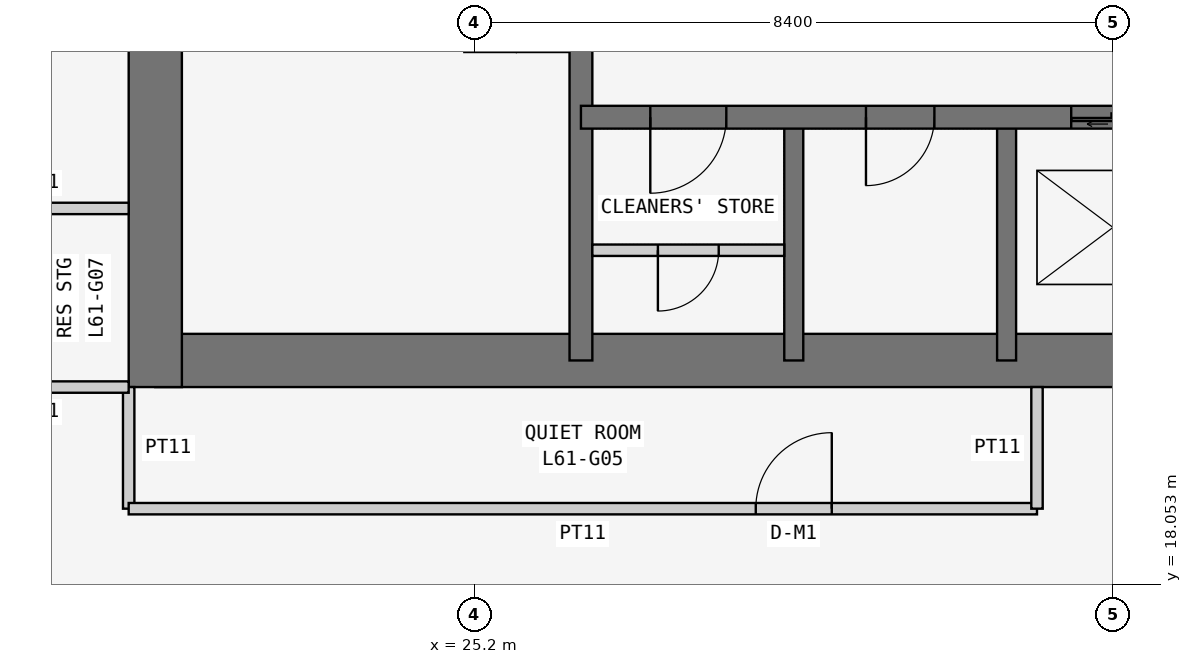
"""IFC4 building model, lengths in metres.
Left out: names, types, materials, properties, quantities, classifications, styles, units other than length and angle.
Written with IfcOpenShell. Run it as: python <this file> out.ifc"""

import sys

from ifc_helpers import new_model, si_unit, direction, frame, frame_2d, origin, place, context, subcontext, project, spatial, rectangle, extrude, element, fill, save


model = new_model("IFC4")
c1 = context("Model", 3, precision=1e-05, world=origin(), true_north=direction((0.0, 1.0)))
c2 = subcontext(c1, "Body", "Model", "MODEL_VIEW")
j1 = project(units=[si_unit("LENGTHUNIT", "METRE"), si_unit("PLANEANGLEUNIT", "RADIAN")], contexts=[c1])
p1 = place(None, origin())
s1 = spatial("IfcSite", under=j1, at=p1, CompositionType="ELEMENT")
p2 = place(p1, origin())
s2 = spatial("IfcBuilding", under=s1, at=p2, CompositionType="ELEMENT")
p3 = place(p2, frame((0.0, 0.0, 233.7)))
s3 = spatial("IfcBuildingStorey", under=s2, at=p3, CompositionType="ELEMENT", Elevation=233.7)
p4 = place(p3, frame((21.0, 21.0, 0.0), z_axis=(0.0, 0.0, 1.0), x_axis=(1.0, 0.0, 0.0)))
e1 = element("IfcWall", 1, at=p4, inside=s3, PredefinedType="SHEAR", context=c2, shape_type="SweptSolid", body=[
    extrude(rectangle(XDim=17.15, YDim=0.7, at=frame_2d((8.575, 0.0))), origin(), (0.0, 0.0, 1.0), 3.6),
])
p5 = place(p3, frame((21.0, 37.8, 0.0), z_axis=(0.0, 0.0, 1.0), x_axis=(0.0, -1.0, 0.0)))
e2 = element("IfcWall", 2, at=p5, inside=s3, PredefinedType="SHEAR", context=c2, shape_type="SweptSolid", body=[
    extrude(rectangle(XDim=17.15, YDim=0.7, at=frame_2d((8.575, 0.0))), origin(), (0.0, 0.0, 1.0), 3.6),
])
p6 = place(p5, frame((5.4, 0.0, 0.0)))
e3 = element("IfcOpeningElement", 3, at=p6, cuts=e2, PredefinedType="OPENING", context=c2, shape_type="SweptSolid", body=[
    extrude(rectangle(XDim=1.2, YDim=2.1, at=frame_2d((0.6, 1.05))), frame((0.0, 0.36, 0.0), z_axis=(0.0, -1.0, 0.0), x_axis=(1.0, 0.0, 0.0)), (0.0, 0.0, 1.0), 0.72),
])
p7 = place(p3, frame((26.6, 21.0, 0.0), z_axis=(0.0, 0.0, 1.0), x_axis=(0.0, 1.0, 0.0)))
e4 = element("IfcWall", 4, at=p7, inside=s3, PredefinedType="SHEAR", context=c2, shape_type="SweptSolid", body=[
    extrude(rectangle(XDim=16.8, YDim=0.3, at=frame_2d((8.4, 0.0))), origin(), (0.0, 0.0, 1.0), 3.6),
])
p8 = place(p7, frame((10.4, 0.0, 0.0)))
e5 = element("IfcOpeningElement", 5, at=p8, cuts=e4, PredefinedType="OPENING", context=c2, shape_type="SweptSolid", body=[
    extrude(rectangle(XDim=1.2, YDim=2.1, at=frame_2d((0.6, 1.05))), frame((0.0, 0.16, 0.0), z_axis=(0.0, -1.0, 0.0), x_axis=(1.0, 0.0, 0.0)), (0.0, 0.0, 1.0), 0.32),
])
p9 = place(p3, frame((26.6, 24.2, 0.0), z_axis=(0.0, 0.0, 1.0), x_axis=(1.0, 0.0, 0.0)))
e6 = element("IfcWall", 6, at=p9, inside=s3, PredefinedType="SHEAR", context=c2, shape_type="SweptSolid", body=[
    extrude(rectangle(XDim=11.2, YDim=0.3, at=frame_2d((5.6, 0.0))), origin(), (0.0, 0.0, 1.0), 3.6),
])
p10 = place(p9, frame((0.913, 0.0, 0.0)))
e7 = element("IfcOpeningElement", 7, at=p10, cuts=e6, PredefinedType="OPENING", context=c2, shape_type="SweptSolid", body=[
    extrude(rectangle(XDim=1.0, YDim=2.1, at=frame_2d((0.5, 1.05))), frame((0.0, 0.16, 0.0), z_axis=(0.0, -1.0, 0.0), x_axis=(1.0, 0.0, 0.0)), (0.0, 0.0, 1.0), 0.32),
])
p11 = place(p9, frame((3.75, 0.0, 0.0)))
e8 = element("IfcOpeningElement", 8, at=p11, cuts=e6, PredefinedType="OPENING", context=c2, shape_type="SweptSolid", body=[
    extrude(rectangle(XDim=0.9, YDim=2.1, at=frame_2d((0.45, 1.05))), frame((0.0, 0.16, 0.0), z_axis=(0.0, -1.0, 0.0), x_axis=(1.0, 0.0, 0.0)), (0.0, 0.0, 1.0), 0.32),
])
p12 = place(p9, frame((6.45, 0.0, 0.0)))
e9 = element("IfcOpeningElement", 9, at=p12, cuts=e6, PredefinedType="OPENING", context=c2, shape_type="SweptSolid", body=[
    extrude(rectangle(XDim=1.1, YDim=2.1, at=frame_2d((0.55, 1.05))), frame((0.0, 0.16, 0.0), z_axis=(0.0, -1.0, 0.0), x_axis=(1.0, 0.0, 0.0)), (0.0, 0.0, 1.0), 0.32),
])
p13 = place(p9, frame((9.1, 0.0, 0.0)))
e10 = element("IfcOpeningElement", 10, at=p13, cuts=e6, PredefinedType="OPENING", context=c2, shape_type="SweptSolid", body=[
    extrude(rectangle(XDim=1.1, YDim=2.1, at=frame_2d((0.55, 1.05))), frame((0.0, 0.16, 0.0), z_axis=(0.0, -1.0, 0.0), x_axis=(1.0, 0.0, 0.0)), (0.0, 0.0, 1.0), 0.32),
])
for number, where, z_axis, x_axis in (
    (11, (29.4, 21.0, 0.0), (0.0, 0.0, 1.0), (0.0, 1.0, 0.0)),
    (12, (32.2, 21.0, 0.0), (0.0, 0.0, 1.0), (0.0, 1.0, 0.0)),
):
    element("IfcWall", number, at=place(p3, frame(where, z_axis=z_axis, x_axis=x_axis)), inside=s3, PredefinedType="SHEAR", context=c2, shape_type="SweptSolid", body=[
        extrude(rectangle(XDim=3.2, YDim=0.25, at=frame_2d((1.6, 0.0))), origin(), (0.0, 0.0, 1.0), 3.6),
    ])
p14 = place(p3, frame((20.65, 20.65, 0.0), z_axis=(0.0, 0.0, 1.0), x_axis=(0.0, -1.0, 0.0)))
e13 = element("IfcWall", 13, at=p14, inside=s3, PredefinedType="PARTITIONING", context=c2, shape_type="SweptSolid", body=[
    extrude(rectangle(XDim=1.6, YDim=0.15, at=frame_2d((0.8, 0.0))), origin(), (0.0, 0.0, 1.0), 3.45),
])
p15 = place(p3, frame((20.65, 19.05, 0.0), z_axis=(0.0, 0.0, 1.0), x_axis=(1.0, 0.0, 0.0)))
e14 = element("IfcWall", 14, at=p15, inside=s3, PredefinedType="PARTITIONING", context=c2, shape_type="SweptSolid", body=[
    extrude(rectangle(XDim=11.95, YDim=0.15, at=frame_2d((5.975, 0.0))), origin(), (0.0, 0.0, 1.0), 3.45),
])
p16 = place(p15, frame((8.25, 0.0, 0.0)))
e15 = element("IfcOpeningElement", 15, at=p16, cuts=e14, PredefinedType="OPENING", context=c2, shape_type="SweptSolid", body=[
    extrude(rectangle(XDim=1.0, YDim=2.1, at=frame_2d((0.5, 1.05))), frame((0.0, 0.085, 0.0), z_axis=(0.0, -1.0, 0.0), x_axis=(1.0, 0.0, 0.0)), (0.0, 0.0, 1.0), 0.17),
])
p17 = place(p3, frame((32.6, 19.05, 0.0), z_axis=(0.0, 0.0, 1.0), x_axis=(0.0, 1.0, 0.0)))
e16 = element("IfcWall", 16, at=p17, inside=s3, PredefinedType="PARTITIONING", context=c2, shape_type="SweptSolid", body=[
    extrude(rectangle(XDim=1.6, YDim=0.15, at=frame_2d((0.8, 0.0))), origin(), (0.0, 0.0, 1.0), 3.45),
])
for number, where, z_axis, x_axis in (
    (17, (20.65, 23.0, 0.0), (0.0, 0.0, 1.0), (-1.0, 0.0, 0.0)),
    (18, (18.2, 20.65, 0.0), (0.0, 0.0, 1.0), (1.0, 0.0, 0.0)),
):
    element("IfcWall", number, at=place(p3, frame(where, z_axis=z_axis, x_axis=x_axis)), inside=s3, PredefinedType="PARTITIONING", context=c2, shape_type="SweptSolid", body=[
        extrude(rectangle(XDim=2.45, YDim=0.15, at=frame_2d((1.225, 0.0))), origin(), (0.0, 0.0, 1.0), 3.45),
    ])
p18 = place(p3, frame((26.75, 22.45, 0.0), z_axis=(0.0, 0.0, 1.0), x_axis=(1.0, 0.0, 0.0)))
e19 = element("IfcWall", 19, at=p18, inside=s3, PredefinedType="PARTITIONING", context=c2, shape_type="SweptSolid", body=[
    extrude(rectangle(XDim=2.525, YDim=0.15, at=frame_2d((1.262, 0.0))), origin(), (0.0, 0.0, 1.0), 3.45),
])
p19 = place(p18, frame((0.863, 0.0, 0.0)))
e20 = element("IfcOpeningElement", 20, at=p19, cuts=e19, PredefinedType="OPENING", context=c2, shape_type="SweptSolid", body=[
    extrude(rectangle(XDim=0.8, YDim=2.1, at=frame_2d((0.4, 1.05))), frame((0.0, 0.085, 0.0), z_axis=(0.0, -1.0, 0.0), x_axis=(1.0, 0.0, 0.0)), (0.0, 0.0, 1.0), 0.17),
])
p20 = place(p16, origin())
e21 = element("IfcDoor", 21, at=p20, inside=s3, OperationType="SINGLE_SWING_RIGHT", PredefinedType="DOOR", context=c2, shape_type="SweptSolid", body=[
    extrude(rectangle(XDim=1.0, YDim=2.1, at=frame_2d((0.5, 1.05))), frame((0.0, 0.025, 0.0), z_axis=(0.0, -1.0, 0.0), x_axis=(1.0, 0.0, 0.0)), (0.0, 0.0, 1.0), 0.05),
])
fill(e15, e21)
p21 = place(p10, frame((1.0, 0.0, 0.0), z_axis=(0.0, 0.0, 1.0), x_axis=(-1.0, 0.0, 0.0)))
e22 = element("IfcDoor", 22, at=p21, inside=s3, OperationType="SINGLE_SWING_RIGHT", PredefinedType="DOOR", context=c2, shape_type="SweptSolid", body=[
    extrude(rectangle(XDim=1.0, YDim=2.1, at=frame_2d((0.5, 1.05))), frame((0.0, 0.025, 0.0), z_axis=(0.0, -1.0, 0.0), x_axis=(1.0, 0.0, 0.0)), (0.0, 0.0, 1.0), 0.05),
])
fill(e7, e22)
p22 = place(p19, frame((0.8, 0.0, 0.0), z_axis=(0.0, 0.0, 1.0), x_axis=(-1.0, 0.0, 0.0)))
e23 = element("IfcDoor", 23, at=p22, inside=s3, OperationType="SINGLE_SWING_RIGHT", PredefinedType="DOOR", context=c2, shape_type="SweptSolid", body=[
    extrude(rectangle(XDim=0.8, YDim=2.1, at=frame_2d((0.4, 1.05))), frame((0.0, 0.025, 0.0), z_axis=(0.0, -1.0, 0.0), x_axis=(1.0, 0.0, 0.0)), (0.0, 0.0, 1.0), 0.05),
])
fill(e20, e23)
p23 = place(p11, frame((0.9, 0.0, 0.0), z_axis=(0.0, 0.0, 1.0), x_axis=(-1.0, 0.0, 0.0)))
e24 = element("IfcDoor", 24, at=p23, inside=s3, OperationType="SINGLE_SWING_RIGHT", PredefinedType="DOOR", context=c2, shape_type="SweptSolid", body=[
    extrude(rectangle(XDim=0.9, YDim=2.1, at=frame_2d((0.45, 1.05))), frame((0.0, 0.025, 0.0), z_axis=(0.0, -1.0, 0.0), x_axis=(1.0, 0.0, 0.0)), (0.0, 0.0, 1.0), 0.05),
])
fill(e8, e24)
p24 = place(p12, origin())
e25 = element("IfcDoor", 25, at=p24, inside=s3, OperationType="DOUBLE_DOOR_SLIDING", PredefinedType="DOOR", context=c2, shape_type="SweptSolid", body=[
    extrude(rectangle(XDim=1.1, YDim=2.1, at=frame_2d((0.55, 1.05))), frame((0.0, 0.025, 0.0), z_axis=(0.0, -1.0, 0.0), x_axis=(1.0, 0.0, 0.0)), (0.0, 0.0, 1.0), 0.05),
])
fill(e9, e25)
save(model, sys.argv[1])
